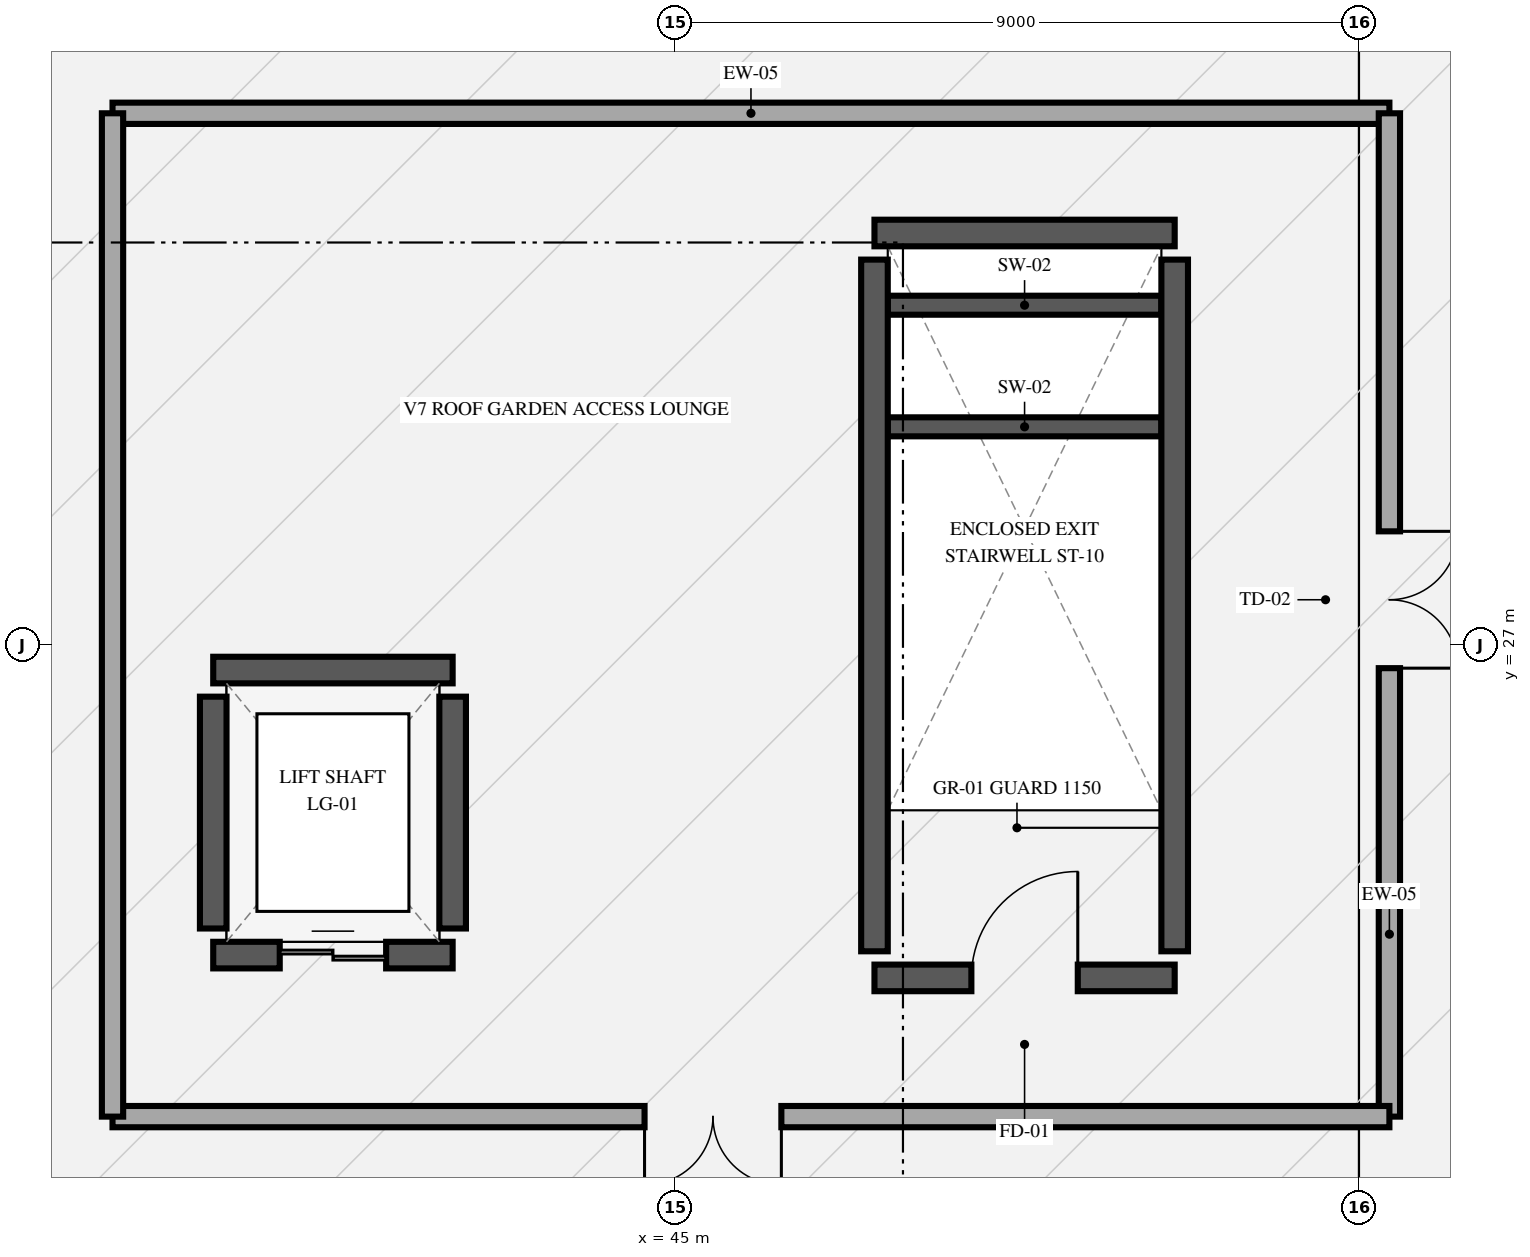
"""IFC4 building model, lengths in metres.
Left out: names, types, materials, properties, quantities, classifications, styles, units other than length and angle.
Written with IfcOpenShell. Run it as: python <this file> out.ifc"""

import sys

from ifc_helpers import new_model, si_unit, direction, frame, frame_2d, origin, place, context, subcontext, project, spatial, rectangle, extrude, element, fill, save


model = new_model("IFC4")
c1 = context("Model", 3, precision=1e-05, world=origin(), true_north=direction((0.0, 1.0)))
c2 = subcontext(c1, "Body", "Model", "MODEL_VIEW")
j1 = project(units=[si_unit("LENGTHUNIT", "METRE"), si_unit("PLANEANGLEUNIT", "RADIAN")], contexts=[c1])
p1 = place(None, origin())
s1 = spatial("IfcSite", under=j1, at=p1, CompositionType="ELEMENT")
p2 = place(p1, origin())
s2 = spatial("IfcBuilding", under=s1, at=p2, CompositionType="ELEMENT")
p3 = place(p2, frame((0.0, 0.0, 16.2)))
s3 = spatial("IfcBuildingStorey", under=s2, at=p3, CompositionType="ELEMENT", Elevation=16.2)
p4 = place(p3, frame((37.6, 34.0, 0.0), z_axis=(0.0, 0.0, 1.0), x_axis=(1.0, 0.0, 0.0)))
e1 = element("IfcWall", 1, at=p4, inside=s3, PredefinedType="SOLIDWALL", context=c2, shape_type="SweptSolid", body=[
    extrude(rectangle(XDim=16.8, YDim=0.28, at=frame_2d((8.4, 0.0))), origin(), (0.0, 0.0, 1.0), 5.25),
])
p5 = place(p3, frame((54.4, 34.0, 0.0), z_axis=(0.0, 0.0, 1.0), x_axis=(0.0, -1.0, 0.0)))
e2 = element("IfcWall", 2, at=p5, inside=s3, PredefinedType="SOLIDWALL", context=c2, shape_type="SweptSolid", body=[
    extrude(rectangle(XDim=13.2, YDim=0.28, at=frame_2d((6.6, 0.0))), origin(), (0.0, 0.0, 1.0), 5.25),
])
p6 = place(p5, frame((5.5, 0.0, 0.0)))
e3 = element("IfcOpeningElement", 3, at=p6, cuts=e2, PredefinedType="OPENING", context=c2, shape_type="SweptSolid", body=[
    extrude(rectangle(XDim=1.8, YDim=2.4, at=frame_2d((0.9, 1.2))), frame((0.0, 0.15, 0.0), z_axis=(0.0, -1.0, 0.0), x_axis=(1.0, 0.0, 0.0)), (0.0, 0.0, 1.0), 0.3),
])
p7 = place(p3, frame((54.4, 20.8, 0.0), z_axis=(0.0, 0.0, 1.0), x_axis=(-1.0, 0.0, 0.0)))
e4 = element("IfcWall", 4, at=p7, inside=s3, PredefinedType="SOLIDWALL", context=c2, shape_type="SweptSolid", body=[
    extrude(rectangle(XDim=16.8, YDim=0.28, at=frame_2d((8.4, 0.0))), origin(), (0.0, 0.0, 1.0), 5.25),
])
p8 = place(p7, frame((8.0, 0.0, 0.0)))
e5 = element("IfcOpeningElement", 5, at=p8, cuts=e4, PredefinedType="OPENING", context=c2, shape_type="SweptSolid", body=[
    extrude(rectangle(XDim=1.8, YDim=2.4, at=frame_2d((0.9, 1.2))), frame((0.0, 0.15, 0.0), z_axis=(0.0, -1.0, 0.0), x_axis=(1.0, 0.0, 0.0)), (0.0, 0.0, 1.0), 0.3),
])
p9 = place(p3, frame((37.6, 20.8, 0.0), z_axis=(0.0, 0.0, 1.0), x_axis=(0.0, 1.0, 0.0)))
e6 = element("IfcWall", 6, at=p9, inside=s3, PredefinedType="SOLIDWALL", context=c2, shape_type="SweptSolid", body=[
    extrude(rectangle(XDim=13.2, YDim=0.28, at=frame_2d((6.6, 0.0))), origin(), (0.0, 0.0, 1.0), 5.25),
])
for number, where, z_axis, x_axis in (
    (7, (47.8, 29.875, 0.0), (0.0, 0.0, 1.0), (1.0, 0.0, 0.0)),
    (8, (47.8, 31.475, 0.0), (0.0, 0.0, 1.0), (1.0, 0.0, 0.0)),
):
    element("IfcWall", number, at=place(p3, frame(where, z_axis=z_axis, x_axis=x_axis)), inside=s3, PredefinedType="SHEAR", context=c2, shape_type="SweptSolid", body=[
        extrude(rectangle(XDim=3.6, YDim=0.25, at=frame_2d((1.8, 0.0))), origin(), (0.0, 0.0, 1.0), 2.5),
    ])
p10 = place(p3, frame((47.625, 22.625, 0.0), z_axis=(0.0, 0.0, 1.0), x_axis=(1.0, 0.0, 0.0)))
e9 = element("IfcWall", 9, at=p10, inside=s3, PredefinedType="SHEAR", context=c2, shape_type="SweptSolid", body=[
    extrude(rectangle(XDim=3.95, YDim=0.35, at=frame_2d((1.975, 0.0))), origin(), (0.0, 0.0, 1.0), 5.25),
])
p11 = place(p10, frame((1.275, 0.0, 0.0)))
e10 = element("IfcOpeningElement", 10, at=p11, cuts=e9, PredefinedType="OPENING", context=c2, shape_type="SweptSolid", body=[
    extrude(rectangle(XDim=1.4, YDim=2.2, at=frame_2d((0.7, 1.1))), frame((0.0, 0.185, 0.0), z_axis=(0.0, -1.0, 0.0), x_axis=(1.0, 0.0, 0.0)), (0.0, 0.0, 1.0), 0.37),
])
p12 = place(p3, frame((47.625, 32.425, 0.0), z_axis=(0.0, 0.0, 1.0), x_axis=(1.0, 0.0, 0.0)))
e11 = element("IfcWall", 11, at=p12, inside=s3, PredefinedType="SHEAR", context=c2, shape_type="SweptSolid", body=[
    extrude(rectangle(XDim=3.95, YDim=0.35, at=frame_2d((1.975, 0.0))), origin(), (0.0, 0.0, 1.0), 5.25),
])
for number, where, z_axis, x_axis in (
    (12, (47.625, 22.975, 0.0), (0.0, 0.0, 1.0), (0.0, 1.0, 0.0)),
    (13, (51.575, 22.975, 0.0), (0.0, 0.0, 1.0), (0.0, 1.0, 0.0)),
):
    element("IfcWall", number, at=place(p3, frame(where, z_axis=z_axis, x_axis=x_axis)), inside=s3, PredefinedType="SHEAR", context=c2, shape_type="SweptSolid", body=[
        extrude(rectangle(XDim=9.1, YDim=0.35, at=frame_2d((4.55, 0.0))), origin(), (0.0, 0.0, 1.0), 5.25),
    ])
p13 = place(p3, frame((38.925, 22.925, 0.0), z_axis=(0.0, 0.0, 1.0), x_axis=(1.0, 0.0, 0.0)))
e14 = element("IfcWall", 14, at=p13, inside=s3, PredefinedType="SHEAR", context=c2, shape_type="SweptSolid", body=[
    extrude(rectangle(XDim=3.15, YDim=0.35, at=frame_2d((1.575, 0.0))), origin(), (0.0, 0.0, 1.0), 5.25),
])
p14 = place(p13, frame((0.875, 0.0, 0.0)))
e15 = element("IfcOpeningElement", 15, at=p14, cuts=e14, PredefinedType="OPENING", context=c2, shape_type="SweptSolid", body=[
    extrude(rectangle(XDim=1.4, YDim=2.3, at=frame_2d((0.7, 1.15))), frame((0.0, 0.185, 0.0), z_axis=(0.0, -1.0, 0.0), x_axis=(1.0, 0.0, 0.0)), (0.0, 0.0, 1.0), 0.37),
])
p15 = place(p3, frame((42.075, 26.675, 0.0), z_axis=(0.0, 0.0, 1.0), x_axis=(-1.0, 0.0, 0.0)))
e16 = element("IfcWall", 16, at=p15, inside=s3, PredefinedType="SHEAR", context=c2, shape_type="SweptSolid", body=[
    extrude(rectangle(XDim=3.15, YDim=0.35, at=frame_2d((1.575, 0.0))), origin(), (0.0, 0.0, 1.0), 5.25),
])
for number, where, z_axis, x_axis in (
    (17, (38.925, 23.275, 0.0), (0.0, 0.0, 1.0), (0.0, 1.0, 0.0)),
    (18, (42.075, 23.275, 0.0), (0.0, 0.0, 1.0), (0.0, 1.0, 0.0)),
):
    element("IfcWall", number, at=place(p3, frame(where, z_axis=z_axis, x_axis=x_axis)), inside=s3, PredefinedType="SHEAR", context=c2, shape_type="SweptSolid", body=[
        extrude(rectangle(XDim=3.05, YDim=0.35, at=frame_2d((1.525, 0.0))), origin(), (0.0, 0.0, 1.0), 5.25),
    ])
p16 = place(p8, origin())
e19 = element("IfcDoor", 19, at=p16, inside=s3, OperationType="DOUBLE_DOOR_SINGLE_SWING", PredefinedType="DOOR", context=c2, shape_type="SweptSolid", body=[
    extrude(rectangle(XDim=1.8, YDim=2.4, at=frame_2d((0.9, 1.2))), frame((0.0, 0.025, 0.0), z_axis=(0.0, -1.0, 0.0), x_axis=(1.0, 0.0, 0.0)), (0.0, 0.0, 1.0), 0.05),
])
fill(e5, e19)
p17 = place(p6, origin())
e20 = element("IfcDoor", 20, at=p17, inside=s3, OperationType="DOUBLE_DOOR_SINGLE_SWING", PredefinedType="DOOR", context=c2, shape_type="SweptSolid", body=[
    extrude(rectangle(XDim=1.8, YDim=2.4, at=frame_2d((0.9, 1.2))), frame((0.0, 0.025, 0.0), z_axis=(0.0, -1.0, 0.0), x_axis=(1.0, 0.0, 0.0)), (0.0, 0.0, 1.0), 0.05),
])
fill(e3, e20)
p18 = place(p11, origin())
e21 = element("IfcDoor", 21, at=p18, inside=s3, OperationType="SINGLE_SWING_RIGHT", PredefinedType="DOOR", context=c2, shape_type="SweptSolid", body=[
    extrude(rectangle(XDim=1.4, YDim=2.2, at=frame_2d((0.7, 1.1))), frame((0.0, 0.025, 0.0), z_axis=(0.0, -1.0, 0.0), x_axis=(1.0, 0.0, 0.0)), (0.0, 0.0, 1.0), 0.05),
])
fill(e10, e21)
p19 = place(p14, origin())
e22 = element("IfcDoor", 22, at=p19, inside=s3, OperationType="DOUBLE_DOOR_SLIDING", PredefinedType="DOOR", context=c2, shape_type="SweptSolid", body=[
    extrude(rectangle(XDim=1.4, YDim=2.3, at=frame_2d((0.7, 1.15))), frame((0.0, 0.025, 0.0), z_axis=(0.0, -1.0, 0.0), x_axis=(1.0, 0.0, 0.0)), (0.0, 0.0, 1.0), 0.05),
])
fill(e15, e22)
save(model, sys.argv[1])
